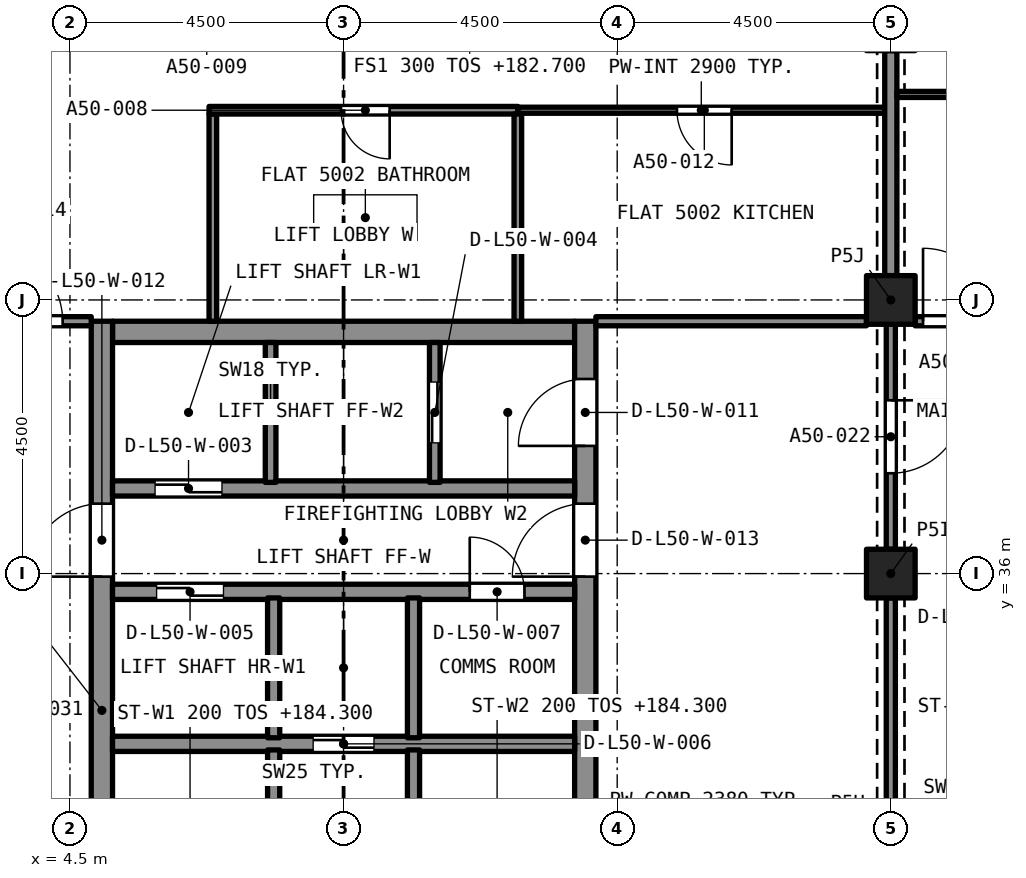
"""IFC4 building model, lengths in metres.
Left out: names, types, materials, properties, quantities, classifications, styles, units other than length and angle.
Written with IfcOpenShell. Run it as: python <this file> out.ifc"""

import sys

from ifc_helpers import new_model, si_unit, direction, frame, frame_2d, origin, origin_2d, place, context, subcontext, project, spatial, rectangle, extrude, element, fill, save


model = new_model("IFC4")
c1 = context("Model", 3, precision=1e-05, world=origin(), true_north=direction((0.0, 1.0)))
c2 = subcontext(c1, "Body", "Model", "MODEL_VIEW")
j1 = project(units=[si_unit("LENGTHUNIT", "METRE"), si_unit("PLANEANGLEUNIT", "RADIAN")], contexts=[c1])
p1 = place(None, origin())
s1 = spatial("IfcSite", under=j1, at=p1, CompositionType="ELEMENT")
p2 = place(p1, origin())
s2 = spatial("IfcBuilding", under=s1, at=p2, CompositionType="ELEMENT")
p3 = place(p2, frame((0.0, 0.0, 182.7)))
s3 = spatial("IfcBuildingStorey", under=s2, at=p3, CompositionType="ELEMENT", Elevation=182.7)
for number, where, z_axis, x_axis in (
    (1, (18.0, 36.0, 0.0), (0.0, 0.0, 1.0), (1.0, 0.0, 0.0)),
    (2, (18.0, 40.5, 0.0), (0.0, 0.0, 1.0), (1.0, 0.0, 0.0)),
):
    element("IfcColumn", number, at=place(p3, frame(where, z_axis=z_axis, x_axis=x_axis)), inside=s3, PredefinedType="COLUMN", context=c2, shape_type="SweptSolid", body=[
        extrude(rectangle(XDim=0.8, YDim=0.8, at=origin_2d()), origin(), (0.0, 0.0, 1.0), 3.2),
    ])
p4 = place(p3, frame((5.2, 39.975, 0.0), z_axis=(0.0, 0.0, 1.0), x_axis=(1.0, 0.0, 0.0)))
e3 = element("IfcWall", 3, at=p4, inside=s3, PredefinedType="SOLIDWALL", context=c2, shape_type="SweptSolid", body=[
    extrude(rectangle(XDim=7.6, YDim=0.35, at=frame_2d((3.8, 0.0))), origin(), (0.0, 0.0, 1.0), 3.2),
])
p5 = place(p3, frame((5.025, 27.35, 0.0), z_axis=(0.0, 0.0, 1.0), x_axis=(0.0, 1.0, 0.0)))
e4 = element("IfcWall", 4, at=p5, inside=s3, PredefinedType="SOLIDWALL", context=c2, shape_type="SweptSolid", body=[
    extrude(rectangle(XDim=12.8, YDim=0.35, at=frame_2d((6.4, 0.0))), origin(), (0.0, 0.0, 1.0), 3.2),
])
p6 = place(p5, frame((8.6, 0.0, 0.0)))
e5 = element("IfcOpeningElement", 5, at=p6, cuts=e4, PredefinedType="OPENING", context=c2, shape_type="SweptSolid", body=[
    extrude(rectangle(XDim=1.2, YDim=2.1, at=frame_2d((0.6, 1.05))), frame((0.0, 0.185, 0.0), z_axis=(0.0, -1.0, 0.0), x_axis=(1.0, 0.0, 0.0)), (0.0, 0.0, 1.0), 0.37),
])
p7 = place(p3, frame((12.975, 27.35, 0.0), z_axis=(0.0, 0.0, 1.0), x_axis=(0.0, 1.0, 0.0)))
e6 = element("IfcWall", 6, at=p7, inside=s3, PredefinedType="SOLIDWALL", context=c2, shape_type="SweptSolid", body=[
    extrude(rectangle(XDim=12.8, YDim=0.35, at=frame_2d((6.4, 0.0))), origin(), (0.0, 0.0, 1.0), 3.2),
])
p8 = place(p7, frame((10.75, 0.0, 0.0)))
e7 = element("IfcOpeningElement", 7, at=p8, cuts=e6, PredefinedType="OPENING", context=c2, shape_type="SweptSolid", body=[
    extrude(rectangle(XDim=1.1, YDim=2.1, at=frame_2d((0.55, 1.05))), frame((0.0, 0.185, 0.0), z_axis=(0.0, -1.0, 0.0), x_axis=(1.0, 0.0, 0.0)), (0.0, 0.0, 1.0), 0.37),
])
p9 = place(p7, frame((8.6, 0.0, 0.0)))
e8 = element("IfcOpeningElement", 8, at=p9, cuts=e6, PredefinedType="OPENING", context=c2, shape_type="SweptSolid", body=[
    extrude(rectangle(XDim=1.2, YDim=2.1, at=frame_2d((0.6, 1.05))), frame((0.0, 0.185, 0.0), z_axis=(0.0, -1.0, 0.0), x_axis=(1.0, 0.0, 0.0)), (0.0, 0.0, 1.0), 0.37),
])
p10 = place(p3, frame((6.85, 40.15, 0.0), z_axis=(0.0, 0.0, 1.0), x_axis=(0.0, 1.0, 0.0)))
e9 = element("IfcWall", 9, at=p10, inside=s3, PredefinedType="PARTITIONING", context=c2, shape_type="SweptSolid", body=[
    extrude(rectangle(XDim=3.408, YDim=0.125, at=frame_2d((1.704, 0.0))), origin(), (0.0, 0.0, 1.0), 2.9),
])
p11 = place(p3, frame((11.866, 43.62, 0.0), z_axis=(0.0, 0.0, 1.0), x_axis=(-1.0, 0.0, 0.0)))
e10 = element("IfcWall", 10, at=p11, inside=s3, PredefinedType="PARTITIONING", context=c2, shape_type="SweptSolid", body=[
    extrude(rectangle(XDim=5.078, YDim=0.125, at=frame_2d((2.539, 0.0))), origin(), (0.0, 0.0, 1.0), 2.9),
])
p12 = place(p11, frame((2.108, 0.0, 0.0)))
e11 = element("IfcOpeningElement", 11, at=p12, cuts=e10, PredefinedType="OPENING", context=c2, shape_type="SweptSolid", body=[
    extrude(rectangle(XDim=0.8, YDim=2.1, at=frame_2d((0.4, 1.05))), frame((0.0, 0.073, 0.0), z_axis=(0.0, -1.0, 0.0), x_axis=(1.0, 0.0, 0.0)), (0.0, 0.0, 1.0), 0.145),
])
p13 = place(p3, frame((11.866, 40.15, 0.0), z_axis=(0.0, 0.0, 1.0), x_axis=(0.0, 1.0, 0.0)))
e12 = element("IfcWall", 12, at=p13, inside=s3, PredefinedType="PARTITIONING", context=c2, shape_type="SweptSolid", body=[
    extrude(rectangle(XDim=3.408, YDim=0.125, at=frame_2d((1.704, 0.0))), origin(), (0.0, 0.0, 1.0), 2.9),
])
p14 = place(p3, frame((17.9, 43.62, 0.0), z_axis=(0.0, 0.0, 1.0), x_axis=(-1.0, 0.0, 0.0)))
e13 = element("IfcWall", 13, at=p14, inside=s3, PredefinedType="PARTITIONING", context=c2, shape_type="SweptSolid", body=[
    extrude(rectangle(XDim=6.034, YDim=0.1, at=frame_2d((3.017, 0.0))), origin(), (0.0, 0.0, 1.0), 2.9),
])
p15 = place(p14, frame((2.517, 0.0, 0.0)))
e14 = element("IfcOpeningElement", 14, at=p15, cuts=e13, PredefinedType="OPENING", context=c2, shape_type="SweptSolid", body=[
    extrude(rectangle(XDim=0.9, YDim=2.1, at=frame_2d((0.45, 1.05))), frame((0.0, 0.06, 0.0), z_axis=(0.0, -1.0, 0.0), x_axis=(1.0, 0.0, 0.0)), (0.0, 0.0, 1.0), 0.12),
])
p16 = place(p3, frame((3.05, 40.15, 0.0), z_axis=(0.0, 0.0, 1.0), x_axis=(1.0, 0.0, 0.0)))
e15 = element("IfcWall", 15, at=p16, inside=s3, PredefinedType="PARTITIONING", context=c2, shape_type="SweptSolid", body=[
    extrude(rectangle(XDim=1.8, YDim=0.15, at=frame_2d((0.9, 0.0))), origin(), (0.0, 0.0, 1.0), 2.9),
])
p17 = place(p16, frame((0.13, 0.0, 0.0)))
e16 = element("IfcOpeningElement", 16, at=p17, cuts=e15, PredefinedType="OPENING", context=c2, shape_type="SweptSolid", body=[
    extrude(rectangle(XDim=1.2, YDim=2.4, at=frame_2d((0.6, 1.2))), frame((0.0, 0.085, 0.0), z_axis=(0.0, -1.0, 0.0), x_axis=(1.0, 0.0, 0.0)), (0.0, 0.0, 1.0), 0.17),
])
p18 = place(p3, frame((18.0, 40.9, 0.0), z_axis=(0.0, 0.0, 1.0), x_axis=(0.0, 1.0, 0.0)))
e17 = element("IfcWall", 17, at=p18, inside=s3, PredefinedType="PARTITIONING", context=c2, shape_type="SweptSolid", body=[
    extrude(rectangle(XDim=3.7, YDim=0.2, at=frame_2d((1.85, 0.0))), origin(), (0.0, 0.0, 1.0), 2.38),
])
p19 = place(p3, frame((13.15, 40.15, 0.0), z_axis=(0.0, 0.0, 1.0), x_axis=(1.0, 0.0, 0.0)))
e18 = element("IfcWall", 18, at=p19, inside=s3, PredefinedType="PARTITIONING", context=c2, shape_type="SweptSolid", body=[
    extrude(rectangle(XDim=4.45, YDim=0.15, at=frame_2d((2.225, 0.0))), origin(), (0.0, 0.0, 1.0), 2.9),
])
p20 = place(p3, frame((18.1, 43.88, 0.0), z_axis=(0.0, 0.0, 1.0), x_axis=(1.0, 0.0, 0.0)))
e19 = element("IfcWall", 19, at=p20, inside=s3, PredefinedType="PARTITIONING", context=c2, shape_type="SweptSolid", body=[
    extrude(rectangle(XDim=4.4, YDim=0.1, at=frame_2d((2.2, 0.0))), origin(), (0.0, 0.0, 1.0), 2.75),
])
p21 = place(p20, frame((1.7, 0.0, 0.0)))
e20 = element("IfcOpeningElement", 20, at=p21, cuts=e19, PredefinedType="OPENING", context=c2, shape_type="SweptSolid", body=[
    extrude(rectangle(XDim=0.9, YDim=2.1, at=frame_2d((0.45, 1.05))), frame((0.0, 0.06, 0.0), z_axis=(0.0, -1.0, 0.0), x_axis=(1.0, 0.0, 0.0)), (0.0, 0.0, 1.0), 0.12),
])
p22 = place(p3, frame((18.4, 40.15, 0.0), z_axis=(0.0, 0.0, 1.0), x_axis=(1.0, 0.0, 0.0)))
e21 = element("IfcWall", 21, at=p22, inside=s3, PredefinedType="PARTITIONING", context=c2, shape_type="SweptSolid", body=[
    extrude(rectangle(XDim=1.95, YDim=0.15, at=frame_2d((0.975, 0.0))), origin(), (0.0, 0.0, 1.0), 2.75),
])
p23 = place(p22, frame((0.13, 0.0, 0.0)))
e22 = element("IfcOpeningElement", 22, at=p23, cuts=e21, PredefinedType="OPENING", context=c2, shape_type="SweptSolid", body=[
    extrude(rectangle(XDim=1.2, YDim=2.4, at=frame_2d((0.6, 1.2))), frame((0.0, 0.085, 0.0), z_axis=(0.0, -1.0, 0.0), x_axis=(1.0, 0.0, 0.0)), (0.0, 0.0, 1.0), 0.17),
])
p24 = place(p3, frame((18.0, 31.9, 0.0), z_axis=(0.0, 0.0, 1.0), x_axis=(0.0, 1.0, 0.0)))
e23 = element("IfcWall", 23, at=p24, inside=s3, PredefinedType="PARTITIONING", context=c2, shape_type="SweptSolid", body=[
    extrude(rectangle(XDim=3.7, YDim=0.15, at=frame_2d((1.85, 0.0))), origin(), (0.0, 0.0, 1.0), 2.38),
])
p25 = place(p3, frame((18.0, 40.1, 0.0), z_axis=(0.0, 0.0, 1.0), x_axis=(0.0, -1.0, 0.0)))
e24 = element("IfcWall", 24, at=p25, inside=s3, PredefinedType="PARTITIONING", context=c2, shape_type="SweptSolid", body=[
    extrude(rectangle(XDim=3.7, YDim=0.15, at=frame_2d((1.85, 0.0))), origin(), (0.0, 0.0, 1.0), 2.38),
])
p26 = place(p25, frame((1.25, 0.0, 0.0)))
e25 = element("IfcOpeningElement", 25, at=p26, cuts=e24, PredefinedType="OPENING", context=c2, shape_type="SweptSolid", body=[
    extrude(rectangle(XDim=1.2, YDim=2.1, at=frame_2d((0.6, 1.05))), frame((0.0, 0.085, 0.0), z_axis=(0.0, -1.0, 0.0), x_axis=(1.0, 0.0, 0.0)), (0.0, 0.0, 1.0), 0.17),
])
p27 = place(p3, frame((5.2, 33.2, 0.0), z_axis=(0.0, 0.0, 1.0), x_axis=(1.0, 0.0, 0.0)))
e26 = element("IfcWall", 26, at=p27, inside=s3, PredefinedType="SOLIDWALL", context=c2, shape_type="SweptSolid", body=[
    extrude(rectangle(XDim=7.6, YDim=0.25, at=frame_2d((3.8, 0.0))), origin(), (0.0, 0.0, 1.0), 2.9),
])
p28 = place(p27, frame((3.3, 0.0, 0.0)))
e27 = element("IfcOpeningElement", 27, at=p28, cuts=e26, PredefinedType="OPENING", context=c2, shape_type="SweptSolid", body=[
    extrude(rectangle(XDim=1.0, YDim=2.1, at=frame_2d((0.5, 1.05))), frame((0.0, 0.135, 0.0), z_axis=(0.0, -1.0, 0.0), x_axis=(1.0, 0.0, 0.0)), (0.0, 0.0, 1.0), 0.27),
])
p29 = place(p3, frame((5.2, 35.7, 0.0), z_axis=(0.0, 0.0, 1.0), x_axis=(1.0, 0.0, 0.0)))
e28 = element("IfcWall", 28, at=p29, inside=s3, PredefinedType="SOLIDWALL", context=c2, shape_type="SweptSolid", body=[
    extrude(rectangle(XDim=7.6, YDim=0.25, at=frame_2d((3.8, 0.0))), origin(), (0.0, 0.0, 1.0), 2.9),
])
p30 = place(p29, frame((0.725, 0.0, 0.0)))
e29 = element("IfcOpeningElement", 29, at=p30, cuts=e28, PredefinedType="OPENING", context=c2, shape_type="SweptSolid", body=[
    extrude(rectangle(XDim=1.1, YDim=2.4, at=frame_2d((0.55, 1.2))), frame((0.0, 0.135, 0.0), z_axis=(0.0, -1.0, 0.0), x_axis=(1.0, 0.0, 0.0)), (0.0, 0.0, 1.0), 0.27),
])
p31 = place(p29, frame((5.875, 0.0, 0.0)))
e30 = element("IfcOpeningElement", 30, at=p31, cuts=e28, PredefinedType="OPENING", context=c2, shape_type="SweptSolid", body=[
    extrude(rectangle(XDim=0.9, YDim=2.1, at=frame_2d((0.45, 1.05))), frame((0.0, 0.135, 0.0), z_axis=(0.0, -1.0, 0.0), x_axis=(1.0, 0.0, 0.0)), (0.0, 0.0, 1.0), 0.27),
])
p32 = place(p3, frame((5.2, 37.4, 0.0), z_axis=(0.0, 0.0, 1.0), x_axis=(1.0, 0.0, 0.0)))
e31 = element("IfcWall", 31, at=p32, inside=s3, PredefinedType="SOLIDWALL", context=c2, shape_type="SweptSolid", body=[
    extrude(rectangle(XDim=7.6, YDim=0.25, at=frame_2d((3.8, 0.0))), origin(), (0.0, 0.0, 1.0), 2.9),
])
p33 = place(p32, frame((0.7, 0.0, 0.0)))
e32 = element("IfcOpeningElement", 32, at=p33, cuts=e31, PredefinedType="OPENING", context=c2, shape_type="SweptSolid", body=[
    extrude(rectangle(XDim=1.1, YDim=2.4, at=frame_2d((0.55, 1.2))), frame((0.0, 0.135, 0.0), z_axis=(0.0, -1.0, 0.0), x_axis=(1.0, 0.0, 0.0)), (0.0, 0.0, 1.0), 0.27),
])
p34 = place(p3, frame((7.85, 27.7, 0.0), z_axis=(0.0, 0.0, 1.0), x_axis=(0.0, 1.0, 0.0)))
e33 = element("IfcWall", 33, at=p34, inside=s3, PredefinedType="SOLIDWALL", context=c2, shape_type="SweptSolid", body=[
    extrude(rectangle(XDim=5.4, YDim=0.2, at=frame_2d((2.7, 0.0))), origin(), (0.0, 0.0, 1.0), 2.9),
])
p35 = place(p34, frame((0.2, 0.0, 0.0)))
e34 = element("IfcOpeningElement", 34, at=p35, cuts=e33, PredefinedType="OPENING", context=c2, shape_type="SweptSolid", body=[
    extrude(rectangle(XDim=0.9, YDim=2.1, at=frame_2d((0.45, 1.05))), frame((0.0, 0.11, 0.0), z_axis=(0.0, -1.0, 0.0), x_axis=(1.0, 0.0, 0.0)), (0.0, 0.0, 1.0), 0.22),
])
p36 = place(p3, frame((10.15, 27.7, 0.0), z_axis=(0.0, 0.0, 1.0), x_axis=(0.0, 1.0, 0.0)))
e35 = element("IfcWall", 35, at=p36, inside=s3, PredefinedType="SOLIDWALL", context=c2, shape_type="SweptSolid", body=[
    extrude(rectangle(XDim=5.4, YDim=0.2, at=frame_2d((2.7, 0.0))), origin(), (0.0, 0.0, 1.0), 2.9),
])
p37 = place(p36, frame((0.2, 0.0, 0.0)))
e36 = element("IfcOpeningElement", 36, at=p37, cuts=e35, PredefinedType="OPENING", context=c2, shape_type="SweptSolid", body=[
    extrude(rectangle(XDim=0.9, YDim=2.1, at=frame_2d((0.45, 1.05))), frame((0.0, 0.11, 0.0), z_axis=(0.0, -1.0, 0.0), x_axis=(1.0, 0.0, 0.0)), (0.0, 0.0, 1.0), 0.22),
])
for number, where, z_axis, x_axis in (
    (37, (7.85, 33.3, 0.0), (0.0, 0.0, 1.0), (0.0, 1.0, 0.0)),
    (38, (10.15, 33.3, 0.0), (0.0, 0.0, 1.0), (0.0, 1.0, 0.0)),
):
    element("IfcWall", number, at=place(p3, frame(where, z_axis=z_axis, x_axis=x_axis)), inside=s3, PredefinedType="SOLIDWALL", context=c2, shape_type="SweptSolid", body=[
        extrude(rectangle(XDim=2.3, YDim=0.2, at=frame_2d((1.15, 0.0))), origin(), (0.0, 0.0, 1.0), 2.9),
    ])
p38 = place(p3, frame((7.8, 37.5, 0.0), z_axis=(0.0, 0.0, 1.0), x_axis=(0.0, 1.0, 0.0)))
e39 = element("IfcWall", 39, at=p38, inside=s3, PredefinedType="SOLIDWALL", context=c2, shape_type="SweptSolid", body=[
    extrude(rectangle(XDim=2.3, YDim=0.175, at=frame_2d((1.15, 0.0))), origin(), (0.0, 0.0, 1.0), 2.9),
])
p39 = place(p3, frame((10.5, 37.5, 0.0), z_axis=(0.0, 0.0, 1.0), x_axis=(0.0, 1.0, 0.0)))
e40 = element("IfcWall", 40, at=p39, inside=s3, PredefinedType="SOLIDWALL", context=c2, shape_type="SweptSolid", body=[
    extrude(rectangle(XDim=2.3, YDim=0.175, at=frame_2d((1.15, 0.0))), origin(), (0.0, 0.0, 1.0), 2.9),
])
p40 = place(p39, frame((0.65, 0.0, 0.0)))
e41 = element("IfcOpeningElement", 41, at=p40, cuts=e40, PredefinedType="OPENING", context=c2, shape_type="SweptSolid", body=[
    extrude(rectangle(XDim=1.0, YDim=2.1, at=frame_2d((0.5, 1.05))), frame((0.0, 0.097, 0.0), z_axis=(0.0, -1.0, 0.0), x_axis=(1.0, 0.0, 0.0)), (0.0, 0.0, 1.0), 0.195),
])
p41 = place(p12, origin())
e42 = element("IfcDoor", 42, at=p41, inside=s3, OperationType="SINGLE_SWING_LEFT", PredefinedType="DOOR", context=c2, shape_type="SweptSolid", body=[
    extrude(rectangle(XDim=0.8, YDim=2.1, at=frame_2d((0.4, 1.05))), frame((0.0, 0.025, 0.0), z_axis=(0.0, -1.0, 0.0), x_axis=(1.0, 0.0, 0.0)), (0.0, 0.0, 1.0), 0.05),
])
fill(e11, e42)
p42 = place(p15, origin())
e43 = element("IfcDoor", 43, at=p42, inside=s3, OperationType="SINGLE_SWING_LEFT", PredefinedType="DOOR", context=c2, shape_type="SweptSolid", body=[
    extrude(rectangle(XDim=0.9, YDim=2.1, at=frame_2d((0.45, 1.05))), frame((0.0, 0.025, 0.0), z_axis=(0.0, -1.0, 0.0), x_axis=(1.0, 0.0, 0.0)), (0.0, 0.0, 1.0), 0.05),
])
fill(e14, e43)
p43 = place(p17, origin())
e44 = element("IfcDoor", 44, at=p43, inside=s3, OperationType="SINGLE_SWING_LEFT", PredefinedType="DOOR", context=c2, shape_type="SweptSolid", body=[
    extrude(rectangle(XDim=1.2, YDim=2.4, at=frame_2d((0.6, 1.2))), frame((0.0, 0.025, 0.0), z_axis=(0.0, -1.0, 0.0), x_axis=(1.0, 0.0, 0.0)), (0.0, 0.0, 1.0), 0.05),
])
fill(e16, e44)
p44 = place(p23, origin())
e45 = element("IfcDoor", 45, at=p44, inside=s3, OperationType="SINGLE_SWING_LEFT", PredefinedType="DOOR", context=c2, shape_type="SweptSolid", body=[
    extrude(rectangle(XDim=1.2, YDim=2.4, at=frame_2d((0.6, 1.2))), frame((0.0, 0.025, 0.0), z_axis=(0.0, -1.0, 0.0), x_axis=(1.0, 0.0, 0.0)), (0.0, 0.0, 1.0), 0.05),
])
fill(e22, e45)
p45 = place(p26, origin())
e46 = element("IfcDoor", 46, at=p45, inside=s3, OperationType="SINGLE_SWING_LEFT", PredefinedType="DOOR", context=c2, shape_type="SweptSolid", body=[
    extrude(rectangle(XDim=1.2, YDim=2.1, at=frame_2d((0.6, 1.05))), frame((0.0, 0.025, 0.0), z_axis=(0.0, -1.0, 0.0), x_axis=(1.0, 0.0, 0.0)), (0.0, 0.0, 1.0), 0.05),
])
fill(e25, e46)
p46 = place(p33, origin())
e47 = element("IfcDoor", 47, at=p46, inside=s3, OperationType="SLIDING_TO_LEFT", PredefinedType="DOOR", context=c2, shape_type="SweptSolid", body=[
    extrude(rectangle(XDim=1.1, YDim=2.4, at=frame_2d((0.55, 1.2))), frame((0.0, 0.025, 0.0), z_axis=(0.0, -1.0, 0.0), x_axis=(1.0, 0.0, 0.0)), (0.0, 0.0, 1.0), 0.05),
])
fill(e32, e47)
p47 = place(p40, origin())
e48 = element("IfcDoor", 48, at=p47, inside=s3, OperationType="SLIDING_TO_LEFT", PredefinedType="DOOR", context=c2, shape_type="SweptSolid", body=[
    extrude(rectangle(XDim=1.0, YDim=2.1, at=frame_2d((0.5, 1.05))), frame((0.0, 0.025, 0.0), z_axis=(0.0, -1.0, 0.0), x_axis=(1.0, 0.0, 0.0)), (0.0, 0.0, 1.0), 0.05),
])
fill(e41, e48)
p48 = place(p30, origin())
e49 = element("IfcDoor", 49, at=p48, inside=s3, OperationType="SLIDING_TO_LEFT", PredefinedType="DOOR", context=c2, shape_type="SweptSolid", body=[
    extrude(rectangle(XDim=1.1, YDim=2.4, at=frame_2d((0.55, 1.2))), frame((0.0, 0.025, 0.0), z_axis=(0.0, -1.0, 0.0), x_axis=(1.0, 0.0, 0.0)), (0.0, 0.0, 1.0), 0.05),
])
fill(e29, e49)
p49 = place(p28, origin())
e50 = element("IfcDoor", 50, at=p49, inside=s3, OperationType="SLIDING_TO_LEFT", PredefinedType="DOOR", context=c2, shape_type="SweptSolid", body=[
    extrude(rectangle(XDim=1.0, YDim=2.1, at=frame_2d((0.5, 1.05))), frame((0.0, 0.025, 0.0), z_axis=(0.0, -1.0, 0.0), x_axis=(1.0, 0.0, 0.0)), (0.0, 0.0, 1.0), 0.05),
])
fill(e27, e50)
p50 = place(p31, origin())
e51 = element("IfcDoor", 51, at=p50, inside=s3, OperationType="SINGLE_SWING_LEFT", PredefinedType="DOOR", context=c2, shape_type="SweptSolid", body=[
    extrude(rectangle(XDim=0.9, YDim=2.1, at=frame_2d((0.45, 1.05))), frame((0.0, 0.025, 0.0), z_axis=(0.0, -1.0, 0.0), x_axis=(1.0, 0.0, 0.0)), (0.0, 0.0, 1.0), 0.05),
])
fill(e30, e51)
p51 = place(p8, origin())
e52 = element("IfcDoor", 52, at=p51, inside=s3, OperationType="SINGLE_SWING_LEFT", PredefinedType="DOOR", context=c2, shape_type="SweptSolid", body=[
    extrude(rectangle(XDim=1.1, YDim=2.1, at=frame_2d((0.55, 1.05))), frame((0.0, 0.025, 0.0), z_axis=(0.0, -1.0, 0.0), x_axis=(1.0, 0.0, 0.0)), (0.0, 0.0, 1.0), 0.05),
])
fill(e7, e52)
p52 = place(p6, origin())
e53 = element("IfcDoor", 53, at=p52, inside=s3, OperationType="SINGLE_SWING_LEFT", PredefinedType="DOOR", context=c2, shape_type="SweptSolid", body=[
    extrude(rectangle(XDim=1.2, YDim=2.1, at=frame_2d((0.6, 1.05))), frame((0.0, 0.025, 0.0), z_axis=(0.0, -1.0, 0.0), x_axis=(1.0, 0.0, 0.0)), (0.0, 0.0, 1.0), 0.05),
])
fill(e5, e53)
p53 = place(p9, origin())
e54 = element("IfcDoor", 54, at=p53, inside=s3, OperationType="SINGLE_SWING_LEFT", PredefinedType="DOOR", context=c2, shape_type="SweptSolid", body=[
    extrude(rectangle(XDim=1.2, YDim=2.1, at=frame_2d((0.6, 1.05))), frame((0.0, 0.025, 0.0), z_axis=(0.0, -1.0, 0.0), x_axis=(1.0, 0.0, 0.0)), (0.0, 0.0, 1.0), 0.05),
])
fill(e8, e54)
save(model, sys.argv[1])
